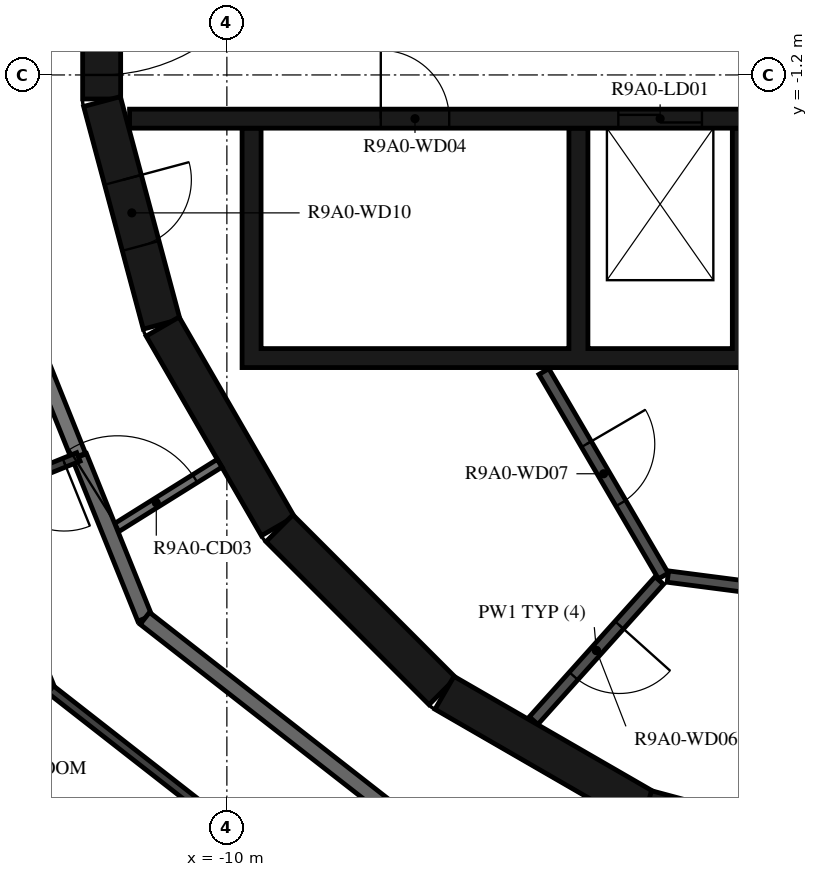
"""IFC4 building model, lengths in metres.
Left out: names, types, materials, properties, quantities, classifications, styles, units other than length and angle.
Written with IfcOpenShell. Run it as: python <this file> out.ifc"""

import sys

from ifc_helpers import new_model, si_unit, direction, frame, frame_2d, origin, place, context, subcontext, project, spatial, polyline, rectangle, outline, extrude, element, fill, save


model = new_model("IFC4")
c1 = context("Model", 3, precision=1e-05, world=origin(), true_north=direction((0.0, 1.0)))
c2 = subcontext(c1, "Body", "Model", "MODEL_VIEW")
j1 = project(units=[si_unit("LENGTHUNIT", "METRE"), si_unit("PLANEANGLEUNIT", "RADIAN")], contexts=[c1])
p1 = place(None, origin())
s1 = spatial("IfcSite", under=j1, at=p1, CompositionType="ELEMENT")
p2 = place(p1, origin())
s2 = spatial("IfcBuilding", under=s1, at=p2, CompositionType="ELEMENT")
p3 = place(p2, frame((0.0, 0.0, 340.0)))
s3 = spatial("IfcBuildingStorey", under=s2, at=p3, CompositionType="ELEMENT", Elevation=340.0)
p4 = place(p3, frame((-11.647, 1.516, 0.0), z_axis=(0.0, 0.0, 1.0), x_axis=(0.0, -1.0, 0.0)))
e1 = element("IfcWall", 1, at=p4, inside=s3, PredefinedType="SHEAR", context=c2, shape_type="SweptSolid", body=[
    extrude(rectangle(XDim=3.033, YDim=0.5, at=frame_2d((1.516, 0.0))), origin(), (0.0, 0.0, 1.0), 3.12),
])
p5 = place(p4, frame((0.316, 0.0, 0.0)))
e2 = element("IfcOpeningElement", 2, at=p5, cuts=e1, PredefinedType="OPENING", context=c2, shape_type="SweptSolid", body=[
    extrude(rectangle(XDim=2.4, YDim=2.1, at=frame_2d((1.2, 1.05))), frame((0.0, 0.26, 0.0), z_axis=(0.0, -1.0, 0.0), x_axis=(1.0, 0.0, 0.0)), (0.0, 0.0, 1.0), 0.52),
])
p6 = place(p3, frame((-11.643, -1.55, 0.0), z_axis=(0.0, 0.0, 1.0), x_axis=(0.258734743916, -0.965948410781, 0.0)))
e3 = element("IfcWall", 3, at=p6, inside=s3, PredefinedType="SHEAR", context=c2, shape_type="SweptSolid", body=[
    extrude(rectangle(XDim=3.033, YDim=0.5, at=frame_2d((1.516, 0.0))), origin(), (0.0, 0.0, 1.0), 3.12),
])
p7 = place(p6, frame((1.066, 0.0, 0.0)))
e4 = element("IfcOpeningElement", 4, at=p7, cuts=e3, PredefinedType="OPENING", context=c2, shape_type="SweptSolid", body=[
    extrude(rectangle(XDim=0.9, YDim=2.1, at=frame_2d((0.45, 1.05))), frame((0.0, 0.26, 0.0), z_axis=(0.0, -1.0, 0.0), x_axis=(1.0, 0.0, 0.0)), (0.0, 0.0, 1.0), 0.52),
])
p8 = place(p3, frame((-10.845, -4.51, 0.0), z_axis=(0.0, 0.0, 1.0), x_axis=(0.500087131594, -0.865975092491, 0.0)))
e5 = element("IfcWall", 5, at=p8, inside=s3, PredefinedType="SHEAR", context=c2, shape_type="SweptSolid", body=[
    extrude(rectangle(XDim=3.033, YDim=0.5, at=frame_2d((1.516, 0.0))), origin(), (0.0, 0.0, 1.0), 3.12),
])
p9 = place(p3, frame((-9.308, -7.164, 0.0), z_axis=(0.0, 0.0, 1.0), x_axis=(0.707106781187, -0.707106781187, 0.0)))
e6 = element("IfcWall", 6, at=p9, inside=s3, PredefinedType="SHEAR", context=c2, shape_type="SweptSolid", body=[
    extrude(rectangle(XDim=3.032, YDim=0.5, at=frame_2d((1.516, 0.0))), origin(), (0.0, 0.0, 1.0), 3.12),
])
for number, where, z_axis, x_axis in (
    (7, (-7.137, -9.329, 0.0), (0.0, 0.0, 1.0), (0.866, -0.5, 0.0)),
    (8, (-4.479, -10.858, 0.0), (0.0, 0.0, 1.0), (0.966, -0.259, 0.0)),
):
    element("IfcWall", number, at=place(p3, frame(where, z_axis=z_axis, x_axis=x_axis)), inside=s3, PredefinedType="SHEAR", context=c2, shape_type="SweptSolid", body=[
        extrude(rectangle(XDim=3.033, YDim=0.5, at=frame_2d((1.516, 0.0))), origin(), (0.0, 0.0, 1.0), 3.12),
    ])
p10 = place(p3, origin())
e9 = element("IfcWall", 9, at=p10, inside=s3, PredefinedType="SHEAR", context=c2, shape_type="SweptSolid", body=[
    extrude(outline(polyline([(9.8, -5.05), (9.8, -4.8), (9.8, -1.9), (9.55, -1.9), (9.55, -4.8), (7.65, -4.8), (7.65, -1.9), (7.4, -1.9), (7.4, -4.8), (5.5, -4.8), (5.5, -1.9), (5.25, -1.9), (5.25, -4.8), (3.35, -4.8), (3.35, -1.9), (3.1, -1.9), (3.1, -4.8), (1.2, -4.8), (1.2, -1.9), (0.95, -1.9), (0.95, -4.8), (-0.95, -4.8), (-0.95, -1.9), (-1.2, -1.9), (-1.2, -4.8), (-3.1, -4.8), (-3.1, -1.9), (-3.35, -1.9), (-3.35, -4.8), (-5.25, -4.8), (-5.25, -1.9), (-5.5, -1.9), (-5.5, -4.8), (-9.55, -4.8), (-9.55, -1.9), (-9.8, -1.9), (-9.8, -4.8), (-9.8, -5.05), (9.8, -5.05)])), origin(), (0.0, 0.0, 1.0), 3.12),
])
p11 = place(p3, frame((-11.28, -1.775, 0.0), z_axis=(0.0, 0.0, 1.0), x_axis=(1.0, 0.0, 0.0)))
e10 = element("IfcWall", 10, at=p11, inside=s3, PredefinedType="SHEAR", context=c2, shape_type="SweptSolid", body=[
    extrude(rectangle(XDim=14.38, YDim=0.25, at=frame_2d((7.19, 0.0))), origin(), (0.0, 0.0, 1.0), 3.12),
])
p12 = place(p11, frame((6.43, 0.0, 0.0)))
e11 = element("IfcOpeningElement", 11, at=p12, cuts=e10, PredefinedType="OPENING", context=c2, shape_type="SweptSolid", body=[
    extrude(rectangle(XDim=1.1, YDim=2.1, at=frame_2d((0.55, 1.05))), frame((0.0, 0.135, 0.0), z_axis=(0.0, -1.0, 0.0), x_axis=(1.0, 0.0, 0.0)), (0.0, 0.0, 1.0), 0.27),
])
p13 = place(p11, frame((8.58, 0.0, 0.0)))
e12 = element("IfcOpeningElement", 12, at=p13, cuts=e10, PredefinedType="OPENING", context=c2, shape_type="SweptSolid", body=[
    extrude(rectangle(XDim=1.1, YDim=2.1, at=frame_2d((0.55, 1.05))), frame((0.0, 0.135, 0.0), z_axis=(0.0, -1.0, 0.0), x_axis=(1.0, 0.0, 0.0)), (0.0, 0.0, 1.0), 0.27),
])
p14 = place(p11, frame((10.73, 0.0, 0.0)))
e13 = element("IfcOpeningElement", 13, at=p14, cuts=e10, PredefinedType="OPENING", context=c2, shape_type="SweptSolid", body=[
    extrude(rectangle(XDim=1.1, YDim=2.1, at=frame_2d((0.55, 1.05))), frame((0.0, 0.135, 0.0), z_axis=(0.0, -1.0, 0.0), x_axis=(1.0, 0.0, 0.0)), (0.0, 0.0, 1.0), 0.27),
])
p15 = place(p11, frame((3.305, 0.0, 0.0)))
e14 = element("IfcOpeningElement", 14, at=p15, cuts=e10, PredefinedType="OPENING", context=c2, shape_type="SweptSolid", body=[
    extrude(rectangle(XDim=0.9, YDim=2.1, at=frame_2d((0.45, 1.05))), frame((0.0, 0.135, 0.0), z_axis=(0.0, -1.0, 0.0), x_axis=(1.0, 0.0, 0.0)), (0.0, 0.0, 1.0), 0.27),
])
p16 = place(p11, frame((12.98, 0.0, 0.0)))
e15 = element("IfcOpeningElement", 15, at=p16, cuts=e10, PredefinedType="OPENING", context=c2, shape_type="SweptSolid", body=[
    extrude(rectangle(XDim=0.9, YDim=2.1, at=frame_2d((0.45, 1.05))), frame((0.0, 0.135, 0.0), z_axis=(0.0, -1.0, 0.0), x_axis=(1.0, 0.0, 0.0)), (0.0, 0.0, 1.0), 0.27),
])
p17 = place(p3, frame((-5.829, -5.102, 0.0), z_axis=(0.0, 0.0, 1.0), x_axis=(0.504480008384, -0.863423373057, 0.0)))
e16 = element("IfcWall", 16, at=p17, inside=s3, PredefinedType="PARTITIONING", context=c2, shape_type="SweptSolid", body=[
    extrude(rectangle(XDim=3.115, YDim=0.15, at=frame_2d((1.558, 0.0))), origin(), (0.0, 0.0, 1.0), 3.12),
])
p18 = place(p17, frame((1.107, 0.0, 0.0)))
e17 = element("IfcOpeningElement", 17, at=p18, cuts=e16, PredefinedType="OPENING", context=c2, shape_type="SweptSolid", body=[
    extrude(rectangle(XDim=0.9, YDim=2.1, at=frame_2d((0.45, 1.05))), frame((0.0, 0.085, 0.0), z_axis=(0.0, -1.0, 0.0), x_axis=(1.0, 0.0, 0.0)), (0.0, 0.0, 1.0), 0.17),
])
p19 = place(p3, frame((-4.311, -7.851, 0.0), z_axis=(0.0, 0.0, 1.0), x_axis=(-0.667869133096, -0.744278725383, 0.0)))
e18 = element("IfcWall", 18, at=p19, inside=s3, PredefinedType="PARTITIONING", context=c2, shape_type="SweptSolid", body=[
    extrude(rectangle(XDim=2.476, YDim=0.15, at=frame_2d((1.238, 0.0))), origin(), (0.0, 0.0, 1.0), 3.12),
])
p20 = place(p19, frame((0.788, 0.0, 0.0)))
e19 = element("IfcOpeningElement", 19, at=p20, cuts=e18, PredefinedType="OPENING", context=c2, shape_type="SweptSolid", body=[
    extrude(rectangle(XDim=0.9, YDim=2.1, at=frame_2d((0.45, 1.05))), frame((0.0, 0.085, 0.0), z_axis=(0.0, -1.0, 0.0), x_axis=(1.0, 0.0, 0.0)), (0.0, 0.0, 1.0), 0.17),
])
p21 = place(p3, frame((-4.198, -7.799, 0.0), z_axis=(0.0, 0.0, 1.0), x_axis=(0.991686747293, -0.128675542523, 0.0)))
e20 = element("IfcWall", 20, at=p21, inside=s3, PredefinedType="PARTITIONING", context=c2, shape_type="SweptSolid", body=[
    extrude(rectangle(XDim=1.793, YDim=0.15, at=frame_2d((0.896, 0.0))), origin(), (0.0, 0.0, 1.0), 3.12),
])
p22 = place(p3, frame((-11.539, -7.21, 0.0), z_axis=(0.0, 0.0, 1.0), x_axis=(0.848103039868, 0.529831325769, 0.0)))
e21 = element("IfcWall", 21, at=p22, inside=s3, PredefinedType="PARTITIONING", context=c2, shape_type="SweptSolid", body=[
    extrude(rectangle(XDim=1.702, YDim=0.12, at=frame_2d((0.851, 0.0))), origin(), (0.0, 0.0, 1.0), 3.12),
])
p23 = place(p22, frame((0.12, 0.0, 0.0)))
e22 = element("IfcOpeningElement", 22, at=p23, cuts=e21, PredefinedType="OPENING", context=c2, shape_type="SweptSolid", body=[
    extrude(rectangle(XDim=1.2, YDim=2.1, at=frame_2d((0.6, 1.05))), frame((0.0, 0.07, 0.0), z_axis=(0.0, -1.0, 0.0), x_axis=(1.0, 0.0, 0.0)), (0.0, 0.0, 1.0), 0.14),
])
p24 = place(p3, frame((-13.769, -1.691, 0.0), z_axis=(0.0, 0.0, 1.0), x_axis=(0.372720094028, -0.927943819155, 0.0)))
e23 = element("IfcWall", 23, at=p24, inside=s3, PredefinedType="STANDARD", context=c2, shape_type="SweptSolid", body=[
    extrude(rectangle(XDim=4.875, YDim=0.2, at=frame_2d((2.438, 0.0))), origin(), (0.0, 0.0, 1.0), 3.12),
])
p25 = place(p3, frame((-11.939, -6.22, 0.0), z_axis=(0.0, 0.0, 1.0), x_axis=(0.374651128394, -0.927165860024, 0.0)))
e24 = element("IfcWall", 24, at=p25, inside=s3, PredefinedType="STANDARD", context=c2, shape_type="SweptSolid", body=[
    extrude(rectangle(XDim=2.296, YDim=0.2, at=frame_2d((1.148, 0.0))), origin(), (0.0, 0.0, 1.0), 3.12),
])
p26 = place(p3, frame((-11.079, -8.349, 0.0), z_axis=(0.0, 0.0, 1.0), x_axis=(0.78800478687, -0.615669112324, 0.0)))
e25 = element("IfcWall", 25, at=p26, inside=s3, PredefinedType="STANDARD", context=c2, shape_type="SweptSolid", body=[
    extrude(rectangle(XDim=7.181, YDim=0.2, at=frame_2d((3.591, 0.0))), origin(), (0.0, 0.0, 1.0), 3.12),
])
p27 = place(p3, frame((-11.953, -6.225, 0.0), z_axis=(0.0, 0.0, 1.0), x_axis=(-0.927144096717, -0.374704982518, 0.0)))
e26 = element("IfcWall", 26, at=p27, inside=s3, PredefinedType="PARTITIONING", context=c2, shape_type="SweptSolid", body=[
    extrude(rectangle(XDim=1.485, YDim=0.12, at=frame_2d((0.742, 0.0))), origin(), (0.0, 0.0, 1.0), 3.12),
])
p28 = place(p27, frame((0.2, 0.0, 0.0)))
e27 = element("IfcOpeningElement", 27, at=p28, cuts=e26, PredefinedType="OPENING", context=c2, shape_type="SweptSolid", body=[
    extrude(rectangle(XDim=0.9, YDim=2.1, at=frame_2d((0.45, 1.05))), frame((0.0, 0.07, 0.0), z_axis=(0.0, -1.0, 0.0), x_axis=(1.0, 0.0, 0.0)), (0.0, 0.0, 1.0), 0.14),
])
p29 = place(p3, frame((-13.33, -6.782, 0.0), z_axis=(0.0, 0.0, 1.0), x_axis=(0.374602180132, -0.927185637637, 0.0)))
e28 = element("IfcWall", 28, at=p29, inside=s3, PredefinedType="PARTITIONING", context=c2, shape_type="SweptSolid", body=[
    extrude(rectangle(XDim=2.698, YDim=0.12, at=frame_2d((1.349, 0.0))), origin(), (0.0, 0.0, 1.0), 3.12),
])
p30 = place(p3, frame((-12.319, -9.283, 0.0), z_axis=(0.0, 0.0, 1.0), x_axis=(0.788000268464, -0.61567489546, 0.0)))
e29 = element("IfcWall", 29, at=p30, inside=s3, PredefinedType="PARTITIONING", context=c2, shape_type="SweptSolid", body=[
    extrude(rectangle(XDim=7.985, YDim=0.12, at=frame_2d((3.992, 0.0))), origin(), (0.0, 0.0, 1.0), 3.12),
])
p31 = place(p30, frame((3.619, 0.0, 0.0)))
e30 = element("IfcOpeningElement", 30, at=p31, cuts=e29, PredefinedType="OPENING", context=c2, shape_type="SweptSolid", body=[
    extrude(rectangle(XDim=0.9, YDim=2.1, at=frame_2d((0.45, 1.05))), frame((0.0, 0.07, 0.0), z_axis=(0.0, -1.0, 0.0), x_axis=(1.0, 0.0, 0.0)), (0.0, 0.0, 1.0), 0.14),
])
p32 = place(p5, origin())
e31 = element("IfcDoor", 31, at=p32, inside=s3, OperationType="DOUBLE_DOOR_SINGLE_SWING", PredefinedType="DOOR", context=c2, shape_type="SweptSolid", body=[
    extrude(rectangle(XDim=2.4, YDim=2.1, at=frame_2d((1.2, 1.05))), frame((0.0, 0.025, 0.0), z_axis=(0.0, -1.0, 0.0), x_axis=(1.0, 0.0, 0.0)), (0.0, 0.0, 1.0), 0.05),
])
fill(e2, e31)
p33 = place(p12, origin())
e32 = element("IfcDoor", 32, at=p33, inside=s3, OperationType="DOUBLE_DOOR_SLIDING", PredefinedType="DOOR", context=c2, shape_type="SweptSolid", body=[
    extrude(rectangle(XDim=1.1, YDim=2.1, at=frame_2d((0.55, 1.05))), frame((0.0, 0.025, 0.0), z_axis=(0.0, -1.0, 0.0), x_axis=(1.0, 0.0, 0.0)), (0.0, 0.0, 1.0), 0.05),
])
fill(e11, e32)
p34 = place(p15, origin())
e33 = element("IfcDoor", 33, at=p34, inside=s3, OperationType="SINGLE_SWING_RIGHT", PredefinedType="DOOR", context=c2, shape_type="SweptSolid", body=[
    extrude(rectangle(XDim=0.9, YDim=2.1, at=frame_2d((0.45, 1.05))), frame((0.0, 0.025, 0.0), z_axis=(0.0, -1.0, 0.0), x_axis=(1.0, 0.0, 0.0)), (0.0, 0.0, 1.0), 0.05),
])
fill(e14, e33)
p35 = place(p20, origin())
e34 = element("IfcDoor", 34, at=p35, inside=s3, OperationType="SINGLE_SWING_RIGHT", PredefinedType="DOOR", context=c2, shape_type="SweptSolid", body=[
    extrude(rectangle(XDim=0.9, YDim=2.1, at=frame_2d((0.45, 1.05))), frame((0.0, 0.025, 0.0), z_axis=(0.0, -1.0, 0.0), x_axis=(1.0, 0.0, 0.0)), (0.0, 0.0, 1.0), 0.05),
])
fill(e19, e34)
p36 = place(p18, origin())
e35 = element("IfcDoor", 35, at=p36, inside=s3, OperationType="SINGLE_SWING_LEFT", PredefinedType="DOOR", context=c2, shape_type="SweptSolid", body=[
    extrude(rectangle(XDim=0.9, YDim=2.1, at=frame_2d((0.45, 1.05))), frame((0.0, 0.025, 0.0), z_axis=(0.0, -1.0, 0.0), x_axis=(1.0, 0.0, 0.0)), (0.0, 0.0, 1.0), 0.05),
])
fill(e17, e35)
p37 = place(p7, origin())
e36 = element("IfcDoor", 36, at=p37, inside=s3, OperationType="SINGLE_SWING_RIGHT", PredefinedType="DOOR", context=c2, shape_type="SweptSolid", body=[
    extrude(rectangle(XDim=0.9, YDim=2.1, at=frame_2d((0.45, 1.05))), frame((0.0, 0.025, 0.0), z_axis=(0.0, -1.0, 0.0), x_axis=(1.0, 0.0, 0.0)), (0.0, 0.0, 1.0), 0.05),
])
fill(e4, e36)
p38 = place(p28, origin())
e37 = element("IfcDoor", 37, at=p38, inside=s3, OperationType="SINGLE_SWING_LEFT", PredefinedType="DOOR", context=c2, shape_type="SweptSolid", body=[
    extrude(rectangle(XDim=0.9, YDim=2.1, at=frame_2d((0.45, 1.05))), frame((0.0, 0.025, 0.0), z_axis=(0.0, -1.0, 0.0), x_axis=(1.0, 0.0, 0.0)), (0.0, 0.0, 1.0), 0.05),
])
fill(e27, e37)
p39 = place(p23, origin())
e38 = element("IfcDoor", 38, at=p39, inside=s3, OperationType="DOUBLE_DOOR_SINGLE_SWING", PredefinedType="DOOR", context=c2, shape_type="SweptSolid", body=[
    extrude(rectangle(XDim=1.2, YDim=2.1, at=frame_2d((0.6, 1.05))), frame((0.0, 0.025, 0.0), z_axis=(0.0, -1.0, 0.0), x_axis=(1.0, 0.0, 0.0)), (0.0, 0.0, 1.0), 0.05),
])
fill(e22, e38)
save(model, sys.argv[1])
